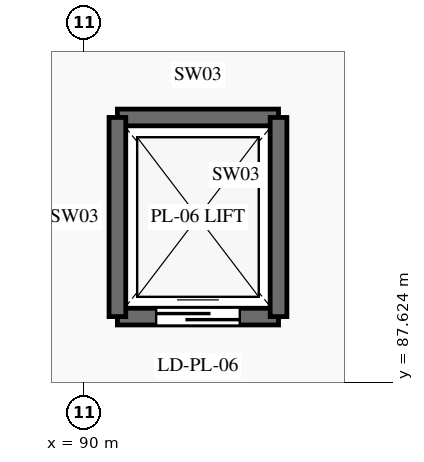
"""IFC4 building model, lengths in metres.
Left out: names, types, materials, properties, quantities, classifications, styles, units other than length and angle.
Written with IfcOpenShell. Run it as: python <this file> out.ifc"""

import sys

from ifc_helpers import new_model, si_unit, direction, frame, frame_2d, origin, place, context, subcontext, project, spatial, rectangle, extrude, element, fill, save


model = new_model("IFC4")
c1 = context("Model", 3, precision=1e-05, world=origin(), true_north=direction((0.0, 1.0)))
c2 = subcontext(c1, "Body", "Model", "MODEL_VIEW")
j1 = project(units=[si_unit("LENGTHUNIT", "METRE"), si_unit("PLANEANGLEUNIT", "RADIAN")], contexts=[c1])
p1 = place(None, origin())
s1 = spatial("IfcSite", under=j1, at=p1, CompositionType="ELEMENT")
p2 = place(p1, origin())
s2 = spatial("IfcBuilding", under=s1, at=p2, CompositionType="ELEMENT")
p3 = place(p2, frame((0.0, 0.0, 10.8)))
s3 = spatial("IfcBuildingStorey", under=s2, at=p3, CompositionType="ELEMENT", Elevation=10.8)
p4 = place(p3, frame((90.44, 88.49, 0.0), z_axis=(0.0, 0.0, 1.0), x_axis=(1.0, 0.0, 0.0)))
e1 = element("IfcWall", 1, at=p4, inside=s3, PredefinedType="SHEAR", context=c2, shape_type="SweptSolid", body=[
    extrude(rectangle(XDim=2.12, YDim=0.22, at=frame_2d((1.06, 0.0))), origin(), (0.0, 0.0, 1.0), 4.2),
])
p5 = place(p4, frame((0.51, 0.0, 0.0)))
e2 = element("IfcOpeningElement", 2, at=p5, cuts=e1, PredefinedType="OPENING", context=c2, shape_type="SweptSolid", body=[
    extrude(rectangle(XDim=1.1, YDim=2.15, at=frame_2d((0.55, 1.075))), frame((0.0, 0.125, 0.0), z_axis=(0.0, -1.0, 0.0), x_axis=(1.0, 0.0, 0.0)), (0.0, 0.0, 1.0), 0.25),
])
p6 = place(p3, frame((90.44, 91.11, 0.0), z_axis=(0.0, 0.0, 1.0), x_axis=(1.0, 0.0, 0.0)))
e3 = element("IfcWall", 3, at=p6, inside=s3, PredefinedType="SHEAR", context=c2, shape_type="SweptSolid", body=[
    extrude(rectangle(XDim=2.12, YDim=0.22, at=frame_2d((1.06, 0.0))), origin(), (0.0, 0.0, 1.0), 4.2),
])
for number, where, z_axis, x_axis in (
    (4, (90.44, 88.49, 0.0), (0.0, 0.0, 1.0), (0.0, 1.0, 0.0)),
    (5, (92.56, 88.49, 0.0), (0.0, 0.0, 1.0), (0.0, 1.0, 0.0)),
):
    element("IfcWall", number, at=place(p3, frame(where, z_axis=z_axis, x_axis=x_axis)), inside=s3, PredefinedType="SHEAR", context=c2, shape_type="SweptSolid", body=[
        extrude(rectangle(XDim=2.62, YDim=0.22, at=frame_2d((1.31, 0.0))), origin(), (0.0, 0.0, 1.0), 4.2),
    ])
p7 = place(p5, origin())
e6 = element("IfcDoor", 6, at=p7, inside=s3, OperationType="SLIDING_TO_LEFT", PredefinedType="DOOR", context=c2, shape_type="SweptSolid", body=[
    extrude(rectangle(XDim=1.1, YDim=2.15, at=frame_2d((0.55, 1.075))), frame((0.0, 0.025, 0.0), z_axis=(0.0, -1.0, 0.0), x_axis=(1.0, 0.0, 0.0)), (0.0, 0.0, 1.0), 0.05),
])
fill(e2, e6)
save(model, sys.argv[1])
